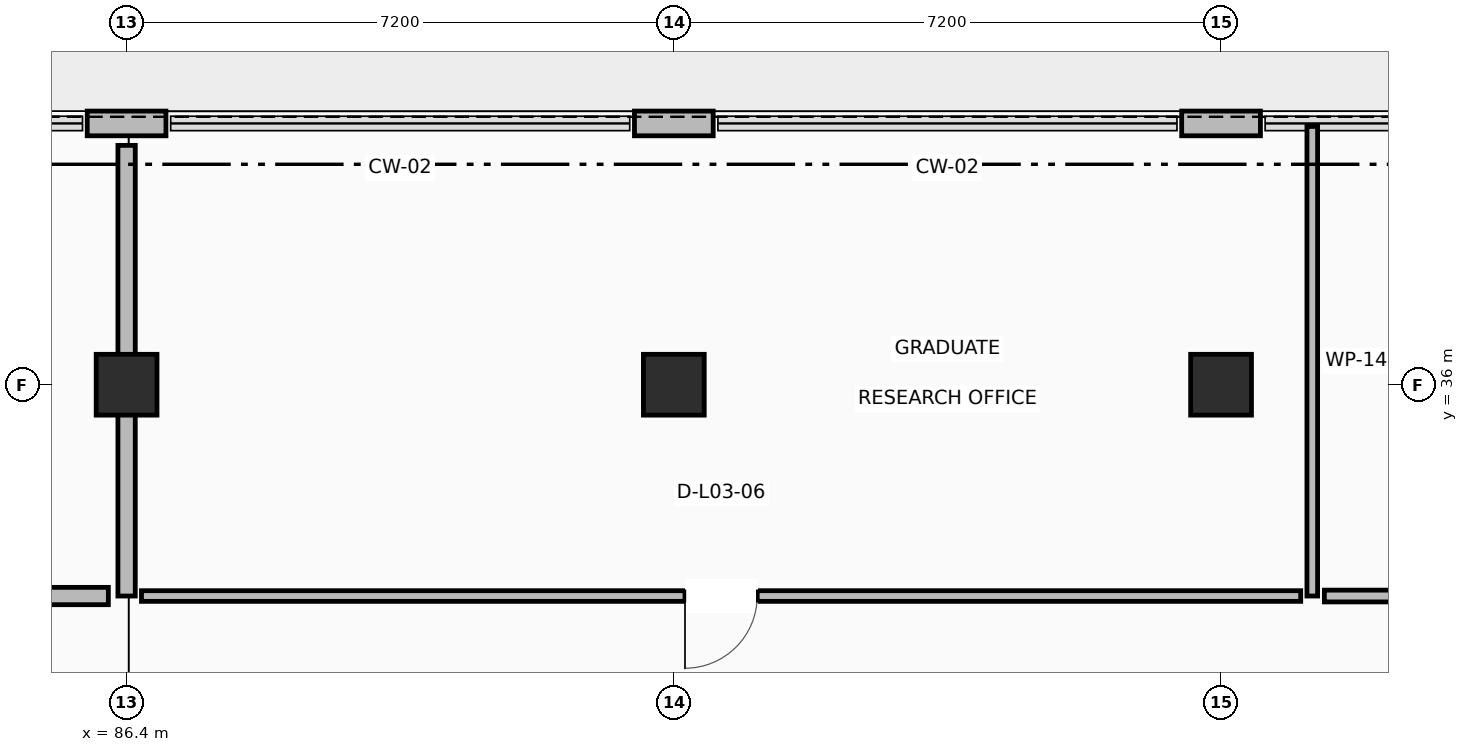
"""IFC4 building model, lengths in metres.
Left out: names, types, materials, properties, quantities, classifications, styles, units other than length and angle.
Written with IfcOpenShell. Run it as: python <this file> out.ifc"""

import sys

from ifc_helpers import new_model, si_unit, direction, frame, frame_2d, origin, origin_2d, place, context, subcontext, project, spatial, rectangle, extrude, element, fill, save


model = new_model("IFC4")
c1 = context("Model", 3, precision=1e-05, world=origin(), true_north=direction((0.0, 1.0)))
c2 = subcontext(c1, "Body", "Model", "MODEL_VIEW")
j1 = project(units=[si_unit("LENGTHUNIT", "METRE"), si_unit("PLANEANGLEUNIT", "RADIAN")], contexts=[c1])
p1 = place(None, origin())
s1 = spatial("IfcSite", under=j1, at=p1, CompositionType="ELEMENT")
p2 = place(p1, origin())
s2 = spatial("IfcBuilding", under=s1, at=p2, CompositionType="ELEMENT")
p3 = place(p2, frame((0.0, 0.0, 13.5)))
s3 = spatial("IfcBuildingStorey", under=s2, at=p3, CompositionType="ELEMENT", Elevation=13.5)
for number, where, z_axis, x_axis in (
    (1, (86.4, 36.0, 0.0), (0.0, 0.0, 1.0), (1.0, 0.0, 0.0)),
    (2, (93.6, 36.0, 0.0), (0.0, 0.0, 1.0), (1.0, 0.0, 0.0)),
    (3, (100.8, 36.0, 0.0), (0.0, 0.0, 1.0), (1.0, 0.0, 0.0)),
):
    element("IfcColumn", number, at=place(p3, frame(where, z_axis=z_axis, x_axis=x_axis)), inside=s3, PredefinedType="COLUMN", context=c2, shape_type="SweptSolid", body=[
        extrude(rectangle(XDim=0.8, YDim=0.8, at=origin_2d()), origin(), (0.0, 0.0, 1.0), 4.22),
    ])
p4 = place(p3, frame((101.318, 39.438, 0.0), z_axis=(0.0, 0.0, 1.0), x_axis=(-1.0, 0.0, 0.0)))
e4 = element("IfcWall", 4, at=p4, inside=s3, PredefinedType="STANDARD", context=c2, shape_type="SweptSolid", body=[
    extrude(rectangle(XDim=1.036, YDim=0.325, at=frame_2d((0.518, 0.0))), origin(), (0.0, 0.0, 1.0), 3.26),
])
for number, where, z_axis, x_axis in (
    (5, (94.118, 39.438, 0.0), (0.0, 0.0, 1.0), (-1.0, 0.0, 0.0)),
    (6, (86.918, 39.438, 0.0), (0.0, 0.0, 1.0), (-1.0, 0.0, 0.0)),
):
    element("IfcWall", number, at=place(p3, frame(where, z_axis=z_axis, x_axis=x_axis)), inside=s3, PredefinedType="STANDARD", context=c2, shape_type="SweptSolid", body=[
        extrude(rectangle(XDim=1.036, YDim=0.325, at=frame_2d((0.518, 0.0))), origin(), (0.0, 0.0, 1.0), 3.26),
    ])
p5 = place(p3, frame((86.4, 39.149, 0.0), z_axis=(0.0, 0.0, 1.0), x_axis=(0.0, -1.0, 0.0)))
e7 = element("IfcWall", 7, at=p5, inside=s3, PredefinedType="PARTITIONING", context=c2, shape_type="SweptSolid", body=[
    extrude(rectangle(XDim=5.929, YDim=0.228, at=frame_2d((2.964, 0.0))), origin(), (0.0, 0.0, 1.0), 3.26),
])
p6 = place(p3, frame((86.16, 33.22, 0.0), z_axis=(0.0, 0.0, 1.0), x_axis=(-1.0, 0.0, 0.0)))
e8 = element("IfcWall", 8, at=p6, inside=s3, PredefinedType="PARTITIONING", context=c2, shape_type="SweptSolid", body=[
    extrude(rectangle(XDim=28.3, YDim=0.228, at=frame_2d((14.15, 0.0))), origin(), (0.0, 0.0, 1.0), 3.26),
])
p7 = place(p6, frame((13.51, 0.0, 0.0)))
e9 = element("IfcOpeningElement", 9, at=p7, cuts=e8, PredefinedType="OPENING", context=c2, shape_type="SweptSolid", body=[
    extrude(rectangle(XDim=1.28, YDim=2.15, at=frame_2d((0.64, 1.075))), frame((0.0, 0.124, 0.0), z_axis=(0.0, -1.0, 0.0), x_axis=(1.0, 0.0, 0.0)), (0.0, 0.0, 1.0), 0.248),
])
p8 = place(p3, frame((102.0, 39.398, 0.0), z_axis=(0.0, 0.0, 1.0), x_axis=(0.0, -1.0, 0.0)))
e10 = element("IfcWall", 10, at=p8, inside=s3, PredefinedType="PARTITIONING", context=c2, shape_type="SweptSolid", body=[
    extrude(rectangle(XDim=6.178, YDim=0.14, at=frame_2d((3.089, 0.0))), origin(), (0.0, 0.0, 1.0), 3.26),
])
p9 = place(p3, frame((101.848, 33.22, 0.0), z_axis=(0.0, 0.0, 1.0), x_axis=(-1.0, 0.0, 0.0)))
e11 = element("IfcWall", 11, at=p9, inside=s3, PredefinedType="PARTITIONING", context=c2, shape_type="SweptSolid", body=[
    extrude(rectangle(XDim=15.252, YDim=0.14, at=frame_2d((7.626, 0.0))), origin(), (0.0, 0.0, 1.0), 3.26),
])
p10 = place(p9, frame((7.151, 0.0, 0.0)))
e12 = element("IfcOpeningElement", 12, at=p10, cuts=e11, PredefinedType="OPENING", context=c2, shape_type="SweptSolid", body=[
    extrude(rectangle(XDim=0.95, YDim=2.1, at=frame_2d((0.475, 1.05))), frame((0.0, 0.08, 0.0), z_axis=(0.0, -1.0, 0.0), x_axis=(1.0, 0.0, 0.0)), (0.0, 0.0, 1.0), 0.16),
])
p11 = place(p3, frame((114.826, 33.22, 0.0), z_axis=(0.0, 0.0, 1.0), x_axis=(-1.0, 0.0, 0.0)))
e13 = element("IfcWall", 13, at=p11, inside=s3, PredefinedType="PARTITIONING", context=c2, shape_type="SweptSolid", body=[
    extrude(rectangle(XDim=12.667, YDim=0.155, at=frame_2d((6.333, 0.0))), origin(), (0.0, 0.0, 1.0), 3.26),
])
p12 = place(p11, frame((5.808, 0.0, 0.0)))
e14 = element("IfcOpeningElement", 14, at=p12, cuts=e13, PredefinedType="OPENING", context=c2, shape_type="SweptSolid", body=[
    extrude(rectangle(XDim=1.05, YDim=2.15, at=frame_2d((0.525, 1.075))), frame((0.0, 0.087, 0.0), z_axis=(0.0, -1.0, 0.0), x_axis=(1.0, 0.0, 0.0)), (0.0, 0.0, 1.0), 0.175),
])
p13 = place(p10, origin())
e15 = element("IfcDoor", 15, at=p13, inside=s3, OperationType="SINGLE_SWING_RIGHT", PredefinedType="DOOR", context=c2, shape_type="SweptSolid", body=[
    extrude(rectangle(XDim=0.95, YDim=2.1, at=frame_2d((0.475, 1.05))), frame((0.0, 0.025, 0.0), z_axis=(0.0, -1.0, 0.0), x_axis=(1.0, 0.0, 0.0)), (0.0, 0.0, 1.0), 0.05),
])
fill(e12, e15)
save(model, sys.argv[1])
